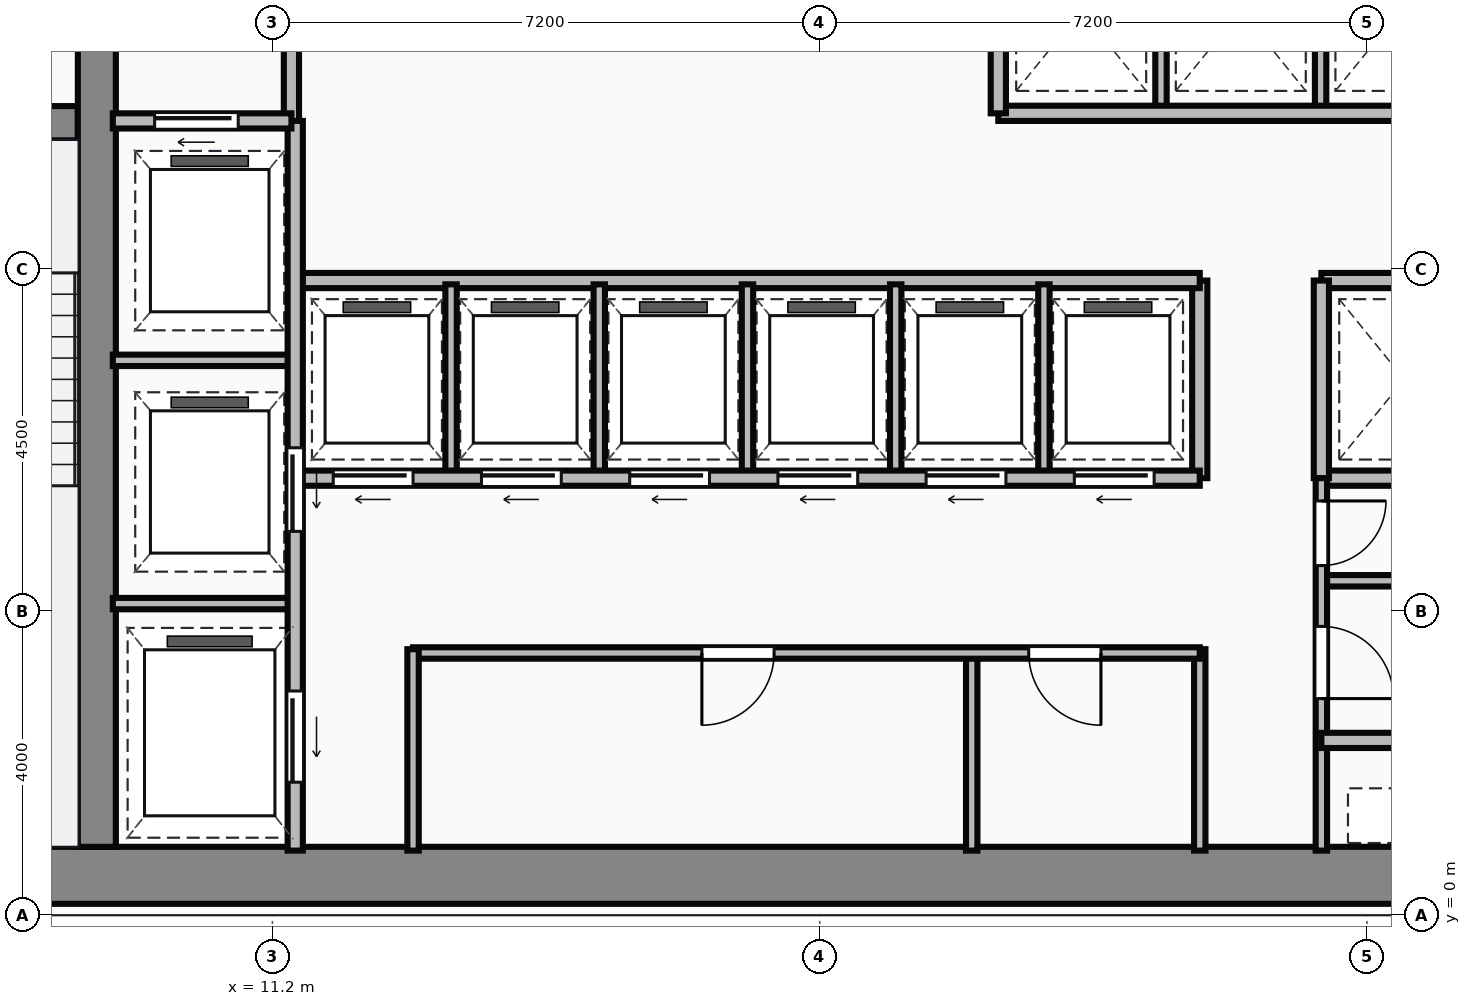
"""IFC4 building model, lengths in metres.
Left out: names, types, materials, properties, quantities, classifications, styles, units other than length and angle.
Written with IfcOpenShell. Run it as: python <this file> out.ifc"""

import sys

from ifc_helpers import new_model, si_unit, direction, frame, frame_2d, origin, place, context, subcontext, project, spatial, rectangle, extrude, source, transform, mapped, element, fill, save


model = new_model("IFC4")
c1 = context("Model", 3, precision=1e-05, world=origin(), true_north=direction((0.0, 1.0)))
c2 = subcontext(c1, "Body", "Model", "MODEL_VIEW")
j1 = project(units=[si_unit("LENGTHUNIT", "METRE"), si_unit("PLANEANGLEUNIT", "RADIAN")], contexts=[c1])
p1 = place(None, origin())
s1 = spatial("IfcSite", under=j1, at=p1, CompositionType="ELEMENT")
p2 = place(p1, origin())
s2 = spatial("IfcBuilding", under=s1, at=p2, CompositionType="ELEMENT")
p3 = place(p2, frame((0.0, 0.0, 140.6)))
s3 = spatial("IfcBuildingStorey", under=s2, at=p3, CompositionType="ELEMENT", Elevation=140.6)
m1 = source(origin(), c2, "Body", "SweptSolid", [
    extrude(rectangle(XDim=29.5, YDim=0.75, at=frame_2d((14.75, 0.0))), origin(), (0.0, 0.0, 1.0), 3.65),
])
p4 = place(p3, frame((4.5, 0.525, 0.0), z_axis=(0.0, 0.0, 1.0), x_axis=(1.0, 0.0, 0.0)))
e1 = element("IfcWall", 1, at=p4, inside=s3, PredefinedType="SHEAR", context=c2, shape_type="MappedRepresentation", body=[
    mapped(m1, transform((0.0, 0.0, 0.0))),
])
m2 = source(origin(), c2, "Body", "SweptSolid", [
    extrude(rectangle(XDim=12.35, YDim=0.5, at=frame_2d((6.175, 0.0))), origin(), (0.0, 0.0, 1.0), 3.65),
])
p5 = place(p3, frame((8.89, 0.9, 0.0), z_axis=(0.0, 0.0, 1.0), x_axis=(0.0, 1.0, 0.0)))
e2 = element("IfcWall", 2, at=p5, inside=s3, PredefinedType="SHEAR", context=c2, shape_type="MappedRepresentation", body=[
    mapped(m2, transform((0.0, 0.0, 0.0))),
])
m3 = source(origin(), c2, "Body", "SweptSolid", [
    extrude(rectangle(XDim=3.39, YDim=0.45, at=frame_2d((1.695, 0.0))), origin(), (0.0, 0.0, 1.0), 3.65),
])
p6 = place(p3, frame((5.25, 10.42, 0.0), z_axis=(0.0, 0.0, 1.0), x_axis=(1.0, 0.0, 0.0)))
e3 = element("IfcWall", 3, at=p6, inside=s3, PredefinedType="SHEAR", context=c2, shape_type="MappedRepresentation", body=[
    mapped(m3, transform((0.0, 0.0, 0.0))),
])
p7 = place(p6, frame((1.05, 0.0, 0.0)))
e4 = element("IfcOpeningElement", 4, at=p7, cuts=e3, PredefinedType="OPENING", context=c2, shape_type="SweptSolid", body=[
    extrude(rectangle(XDim=1.1, YDim=2.15, at=frame_2d((0.55, 1.075))), frame((0.0, 0.235, 0.0), z_axis=(0.0, -1.0, 0.0), x_axis=(1.0, 0.0, 0.0)), (0.0, 0.0, 1.0), 0.47),
])
m4 = source(origin(), c2, "Body", "SweptSolid", [
    extrude(rectangle(XDim=3.18, YDim=0.2, at=frame_2d((1.59, 0.0))), origin(), (0.0, 0.0, 1.0), 3.4),
])
p8 = place(p3, frame((11.45, 10.42, 0.0), z_axis=(0.0, 0.0, 1.0), x_axis=(0.0, 1.0, 0.0)))
e5 = element("IfcWall", 5, at=p8, inside=s3, PredefinedType="PARTITIONING", context=c2, shape_type="MappedRepresentation", body=[
    mapped(m4, transform((0.0, 0.0, 0.0))),
])
m5 = source(origin(), c2, "Body", "SweptSolid", [
    extrude(rectangle(XDim=2.35, YDim=0.2, at=frame_2d((1.175, 0.0))), origin(), (0.0, 0.0, 1.0), 3.4),
])
p9 = place(p3, frame((9.1, 10.45, 0.0), z_axis=(0.0, 0.0, 1.0), x_axis=(1.0, 0.0, 0.0)))
e6 = element("IfcWall", 6, at=p9, inside=s3, PredefinedType="PARTITIONING", context=c2, shape_type="MappedRepresentation", body=[
    mapped(m5, transform((0.0, 0.0, 0.0))),
])
p10 = place(p9, frame((0.55, 0.0, 0.0)))
e7 = element("IfcOpeningElement", 7, at=p10, cuts=e6, PredefinedType="OPENING", context=c2, shape_type="SweptSolid", body=[
    extrude(rectangle(XDim=1.1, YDim=2.15, at=frame_2d((0.55, 1.075))), frame((0.0, 0.11, 0.0), z_axis=(0.0, -1.0, 0.0), x_axis=(1.0, 0.0, 0.0)), (0.0, 0.0, 1.0), 0.22),
])
m6 = source(origin(), c2, "Body", "SweptSolid", [
    extrude(rectangle(XDim=9.6, YDim=0.2, at=frame_2d((4.8, 0.0))), origin(), (0.0, 0.0, 1.0), 3.4),
])
p11 = place(p3, frame((11.5, 0.85, 0.0), z_axis=(0.0, 0.0, 1.0), x_axis=(0.0, 1.0, 0.0)))
e8 = element("IfcWall", 8, at=p11, inside=s3, PredefinedType="PARTITIONING", context=c2, shape_type="MappedRepresentation", body=[
    mapped(m6, transform((0.0, 0.0, 0.0))),
])
p12 = place(p11, frame((4.2, 0.0, 0.0)))
e9 = element("IfcOpeningElement", 9, at=p12, cuts=e8, PredefinedType="OPENING", context=c2, shape_type="SweptSolid", body=[
    extrude(rectangle(XDim=1.1, YDim=2.15, at=frame_2d((0.55, 1.075))), frame((0.0, 0.11, 0.0), z_axis=(0.0, -1.0, 0.0), x_axis=(1.0, 0.0, 0.0)), (0.0, 0.0, 1.0), 0.22),
])
p13 = place(p11, frame((0.9, 0.0, 0.0)))
e10 = element("IfcOpeningElement", 10, at=p13, cuts=e8, PredefinedType="OPENING", context=c2, shape_type="SweptSolid", body=[
    extrude(rectangle(XDim=1.2, YDim=2.15, at=frame_2d((0.6, 1.075))), frame((0.0, 0.11, 0.0), z_axis=(0.0, -1.0, 0.0), x_axis=(1.0, 0.0, 0.0)), (0.0, 0.0, 1.0), 0.22),
])
m7 = source(origin(), c2, "Body", "SweptSolid", [
    extrude(rectangle(XDim=2.4, YDim=0.15, at=frame_2d((1.2, 0.0))), origin(), (0.0, 0.0, 1.0), 3.4),
])
for number, where, z_axis, x_axis in (
    (11, (9.1, 4.1, 0.0), (0.0, 0.0, 1.0), (1.0, 0.0, 0.0)),
    (12, (9.1, 7.3, 0.0), (0.0, 0.0, 1.0), (1.0, 0.0, 0.0)),
):
    element("IfcWall", number, at=place(p3, frame(where, z_axis=z_axis, x_axis=x_axis)), inside=s3, PredefinedType="PARTITIONING", context=c2, shape_type="MappedRepresentation", body=[
        mapped(m7, transform((0.0, 0.0, 0.0))),
    ])
m8 = source(origin(), c2, "Body", "SweptSolid", [
    extrude(rectangle(XDim=2.65, YDim=0.15, at=frame_2d((1.325, 0.0))), origin(), (0.0, 0.0, 1.0), 3.4),
])
p14 = place(p3, frame((13.05, 0.85, 0.0), z_axis=(0.0, 0.0, 1.0), x_axis=(0.0, 1.0, 0.0)))
e13 = element("IfcWall", 13, at=p14, inside=s3, PredefinedType="PARTITIONING", context=c2, shape_type="MappedRepresentation", body=[
    mapped(m8, transform((0.0, 0.0, 0.0))),
])
m9 = source(origin(), c2, "Body", "SweptSolid", [
    extrude(rectangle(XDim=10.35, YDim=0.15, at=frame_2d((5.175, 0.0))), origin(), (0.0, 0.0, 1.0), 3.4),
])
p15 = place(p3, frame((13.05, 3.45, 0.0), z_axis=(0.0, 0.0, 1.0), x_axis=(1.0, 0.0, 0.0)))
e14 = element("IfcWall", 14, at=p15, inside=s3, PredefinedType="PARTITIONING", context=c2, shape_type="MappedRepresentation", body=[
    mapped(m9, transform((0.0, 0.0, 0.0))),
])
p16 = place(p15, frame((3.8, 0.0, 0.0)))
e15 = element("IfcOpeningElement", 15, at=p16, cuts=e14, PredefinedType="OPENING", context=c2, shape_type="SweptSolid", body=[
    extrude(rectangle(XDim=0.95, YDim=2.15, at=frame_2d((0.475, 1.075))), frame((0.0, 0.085, 0.0), z_axis=(0.0, -1.0, 0.0), x_axis=(1.0, 0.0, 0.0)), (0.0, 0.0, 1.0), 0.17),
])
p17 = place(p15, frame((8.1, 0.0, 0.0)))
e16 = element("IfcOpeningElement", 16, at=p17, cuts=e14, PredefinedType="OPENING", context=c2, shape_type="SweptSolid", body=[
    extrude(rectangle(XDim=0.95, YDim=2.15, at=frame_2d((0.475, 1.075))), frame((0.0, 0.085, 0.0), z_axis=(0.0, -1.0, 0.0), x_axis=(1.0, 0.0, 0.0)), (0.0, 0.0, 1.0), 0.17),
])
p18 = place(p3, frame((23.4, 0.85, 0.0), z_axis=(0.0, 0.0, 1.0), x_axis=(0.0, 1.0, 0.0)))
e17 = element("IfcWall", 17, at=p18, inside=s3, PredefinedType="PARTITIONING", context=c2, shape_type="MappedRepresentation", body=[
    mapped(m8, transform((0.0, 0.0, 0.0))),
])
m10 = source(origin(), c2, "Body", "SweptSolid", [
    extrude(rectangle(XDim=2.6, YDim=0.15, at=frame_2d((1.3, 0.0))), origin(), (0.0, 0.0, 1.0), 3.4),
])
p19 = place(p3, frame((20.4, 0.85, 0.0), z_axis=(0.0, 0.0, 1.0), x_axis=(0.0, 1.0, 0.0)))
e18 = element("IfcWall", 18, at=p19, inside=s3, PredefinedType="PARTITIONING", context=c2, shape_type="MappedRepresentation", body=[
    mapped(m10, transform((0.0, 0.0, 0.0))),
])
m11 = source(origin(), c2, "Body", "SweptSolid", [
    extrude(rectangle(XDim=11.85, YDim=0.2, at=frame_2d((5.925, 0.0))), origin(), (0.0, 0.0, 1.0), 3.4),
])
p20 = place(p3, frame((11.55, 5.75, 0.0), z_axis=(0.0, 0.0, 1.0), x_axis=(1.0, 0.0, 0.0)))
e19 = element("IfcWall", 19, at=p20, inside=s3, PredefinedType="PARTITIONING", context=c2, shape_type="MappedRepresentation", body=[
    mapped(m11, transform((0.0, 0.0, 0.0))),
])
p21 = place(p20, frame((0.45, 0.0, 0.0)))
e20 = element("IfcOpeningElement", 20, at=p21, cuts=e19, PredefinedType="OPENING", context=c2, shape_type="SweptSolid", body=[
    extrude(rectangle(XDim=1.05, YDim=2.15, at=frame_2d((0.525, 1.075))), frame((0.0, 0.11, 0.0), z_axis=(0.0, -1.0, 0.0), x_axis=(1.0, 0.0, 0.0)), (0.0, 0.0, 1.0), 0.22),
])
p22 = place(p20, frame((2.4, 0.0, 0.0)))
e21 = element("IfcOpeningElement", 21, at=p22, cuts=e19, PredefinedType="OPENING", context=c2, shape_type="SweptSolid", body=[
    extrude(rectangle(XDim=1.05, YDim=2.15, at=frame_2d((0.525, 1.075))), frame((0.0, 0.11, 0.0), z_axis=(0.0, -1.0, 0.0), x_axis=(1.0, 0.0, 0.0)), (0.0, 0.0, 1.0), 0.22),
])
p23 = place(p20, frame((4.35, 0.0, 0.0)))
e22 = element("IfcOpeningElement", 22, at=p23, cuts=e19, PredefinedType="OPENING", context=c2, shape_type="SweptSolid", body=[
    extrude(rectangle(XDim=1.05, YDim=2.15, at=frame_2d((0.525, 1.075))), frame((0.0, 0.11, 0.0), z_axis=(0.0, -1.0, 0.0), x_axis=(1.0, 0.0, 0.0)), (0.0, 0.0, 1.0), 0.22),
])
p24 = place(p20, frame((6.3, 0.0, 0.0)))
e23 = element("IfcOpeningElement", 23, at=p24, cuts=e19, PredefinedType="OPENING", context=c2, shape_type="SweptSolid", body=[
    extrude(rectangle(XDim=1.05, YDim=2.15, at=frame_2d((0.525, 1.075))), frame((0.0, 0.11, 0.0), z_axis=(0.0, -1.0, 0.0), x_axis=(1.0, 0.0, 0.0)), (0.0, 0.0, 1.0), 0.22),
])
p25 = place(p20, frame((8.25, 0.0, 0.0)))
e24 = element("IfcOpeningElement", 24, at=p25, cuts=e19, PredefinedType="OPENING", context=c2, shape_type="SweptSolid", body=[
    extrude(rectangle(XDim=1.05, YDim=2.15, at=frame_2d((0.525, 1.075))), frame((0.0, 0.11, 0.0), z_axis=(0.0, -1.0, 0.0), x_axis=(1.0, 0.0, 0.0)), (0.0, 0.0, 1.0), 0.22),
])
p26 = place(p20, frame((10.2, 0.0, 0.0)))
e25 = element("IfcOpeningElement", 25, at=p26, cuts=e19, PredefinedType="OPENING", context=c2, shape_type="SweptSolid", body=[
    extrude(rectangle(XDim=1.05, YDim=2.15, at=frame_2d((0.525, 1.075))), frame((0.0, 0.11, 0.0), z_axis=(0.0, -1.0, 0.0), x_axis=(1.0, 0.0, 0.0)), (0.0, 0.0, 1.0), 0.22),
])
p27 = place(p3, frame((11.55, 8.35, 0.0), z_axis=(0.0, 0.0, 1.0), x_axis=(1.0, 0.0, 0.0)))
e26 = element("IfcWall", 26, at=p27, inside=s3, PredefinedType="PARTITIONING", context=c2, shape_type="MappedRepresentation", body=[
    mapped(m11, transform((0.0, 0.0, 0.0))),
])
m12 = source(origin(), c2, "Body", "SweptSolid", [
    extrude(rectangle(XDim=2.6, YDim=0.2, at=frame_2d((1.3, 0.0))), origin(), (0.0, 0.0, 1.0), 3.4),
])
p28 = place(p3, frame((23.4, 5.75, 0.0), z_axis=(0.0, 0.0, 1.0), x_axis=(0.0, 1.0, 0.0)))
e27 = element("IfcWall", 27, at=p28, inside=s3, PredefinedType="PARTITIONING", context=c2, shape_type="MappedRepresentation", body=[
    mapped(m12, transform((0.0, 0.0, 0.0))),
])
m13 = source(origin(), c2, "Body", "SweptSolid", [
    extrude(rectangle(XDim=2.5, YDim=0.15, at=frame_2d((1.25, 0.0))), origin(), (0.0, 0.0, 1.0), 3.4),
])
for number, where, z_axis, x_axis in (
    (28, (13.55, 5.8, 0.0), (0.0, 0.0, 1.0), (0.0, 1.0, 0.0)),
    (29, (15.5, 5.8, 0.0), (0.0, 0.0, 1.0), (0.0, 1.0, 0.0)),
    (30, (17.45, 5.8, 0.0), (0.0, 0.0, 1.0), (0.0, 1.0, 0.0)),
    (31, (19.4, 5.8, 0.0), (0.0, 0.0, 1.0), (0.0, 1.0, 0.0)),
    (32, (21.35, 5.8, 0.0), (0.0, 0.0, 1.0), (0.0, 1.0, 0.0)),
):
    element("IfcWall", number, at=place(p3, frame(where, z_axis=z_axis, x_axis=x_axis)), inside=s3, PredefinedType="PARTITIONING", context=c2, shape_type="MappedRepresentation", body=[
        mapped(m13, transform((0.0, 0.0, 0.0))),
    ])
m14 = source(origin(), c2, "Body", "SweptSolid", [
    extrude(rectangle(XDim=8.8, YDim=0.2, at=frame_2d((4.4, 0.0))), origin(), (0.0, 0.0, 1.0), 3.4),
])
p29 = place(p3, frame((20.75, 10.55, 0.0), z_axis=(0.0, 0.0, 1.0), x_axis=(1.0, 0.0, 0.0)))
e33 = element("IfcWall", 33, at=p29, inside=s3, PredefinedType="PARTITIONING", context=c2, shape_type="MappedRepresentation", body=[
    mapped(m14, transform((0.0, 0.0, 0.0))),
])
m15 = source(origin(), c2, "Body", "SweptSolid", [
    extrude(rectangle(XDim=3.0, YDim=0.2, at=frame_2d((1.5, 0.0))), origin(), (0.0, 0.0, 1.0), 3.4),
])
p30 = place(p3, frame((20.75, 10.55, 0.0), z_axis=(0.0, 0.0, 1.0), x_axis=(0.0, 1.0, 0.0)))
e34 = element("IfcWall", 34, at=p30, inside=s3, PredefinedType="PARTITIONING", context=c2, shape_type="MappedRepresentation", body=[
    mapped(m15, transform((0.0, 0.0, 0.0))),
])
m16 = source(origin(), c2, "Body", "SweptSolid", [
    extrude(rectangle(XDim=2.85, YDim=0.15, at=frame_2d((1.425, 0.0))), origin(), (0.0, 0.0, 1.0), 3.4),
])
for number, where, z_axis, x_axis in (
    (35, (22.89, 10.6, 0.0), (0.0, 0.0, 1.0), (0.0, 1.0, 0.0)),
    (36, (24.99, 10.6, 0.0), (0.0, 0.0, 1.0), (0.0, 1.0, 0.0)),
):
    element("IfcWall", number, at=place(p3, frame(where, z_axis=z_axis, x_axis=x_axis)), inside=s3, PredefinedType="PARTITIONING", context=c2, shape_type="MappedRepresentation", body=[
        mapped(m16, transform((0.0, 0.0, 0.0))),
    ])
m17 = source(origin(), c2, "Body", "SweptSolid", [
    extrude(rectangle(XDim=4.55, YDim=0.2, at=frame_2d((2.275, 0.0))), origin(), (0.0, 0.0, 1.0), 3.4),
])
for number, where, z_axis, x_axis in (
    (37, (25.0, 8.35, 0.0), (0.0, 0.0, 1.0), (1.0, 0.0, 0.0)),
    (38, (25.0, 5.75, 0.0), (0.0, 0.0, 1.0), (1.0, 0.0, 0.0)),
):
    element("IfcWall", number, at=place(p3, frame(where, z_axis=z_axis, x_axis=x_axis)), inside=s3, PredefinedType="PARTITIONING", context=c2, shape_type="MappedRepresentation", body=[
        mapped(m17, transform((0.0, 0.0, 0.0))),
    ])
p31 = place(p3, frame((25.0, 5.75, 0.0), z_axis=(0.0, 0.0, 1.0), x_axis=(0.0, 1.0, 0.0)))
e39 = element("IfcWall", 39, at=p31, inside=s3, PredefinedType="PARTITIONING", context=c2, shape_type="MappedRepresentation", body=[
    mapped(m12, transform((0.0, 0.0, 0.0))),
])
m18 = source(origin(), c2, "Body", "SweptSolid", [
    extrude(rectangle(XDim=4.9, YDim=0.15, at=frame_2d((2.45, 0.0))), origin(), (0.0, 0.0, 1.0), 3.4),
])
p32 = place(p3, frame((25.0, 0.85, 0.0), z_axis=(0.0, 0.0, 1.0), x_axis=(0.0, 1.0, 0.0)))
e40 = element("IfcWall", 40, at=p32, inside=s3, PredefinedType="PARTITIONING", context=c2, shape_type="MappedRepresentation", body=[
    mapped(m18, transform((0.0, 0.0, 0.0))),
])
p33 = place(p32, frame((2.0, 0.0, 0.0)))
e41 = element("IfcOpeningElement", 41, at=p33, cuts=e40, PredefinedType="OPENING", context=c2, shape_type="SweptSolid", body=[
    extrude(rectangle(XDim=0.95, YDim=2.15, at=frame_2d((0.475, 1.075))), frame((0.0, 0.085, 0.0), z_axis=(0.0, -1.0, 0.0), x_axis=(1.0, 0.0, 0.0)), (0.0, 0.0, 1.0), 0.17),
])
p34 = place(p32, frame((3.75, 0.0, 0.0)))
e42 = element("IfcOpeningElement", 42, at=p34, cuts=e40, PredefinedType="OPENING", context=c2, shape_type="SweptSolid", body=[
    extrude(rectangle(XDim=0.85, YDim=2.15, at=frame_2d((0.425, 1.075))), frame((0.0, 0.085, 0.0), z_axis=(0.0, -1.0, 0.0), x_axis=(1.0, 0.0, 0.0)), (0.0, 0.0, 1.0), 0.17),
])
m19 = source(origin(), c2, "Body", "SweptSolid", [
    extrude(rectangle(XDim=2.4, YDim=0.2, at=frame_2d((1.2, 0.0))), origin(), (0.0, 0.0, 1.0), 3.4),
])
p35 = place(p3, frame((25.0, 2.3, 0.0), z_axis=(0.0, 0.0, 1.0), x_axis=(1.0, 0.0, 0.0)))
e43 = element("IfcWall", 43, at=p35, inside=s3, PredefinedType="PARTITIONING", context=c2, shape_type="MappedRepresentation", body=[
    mapped(m19, transform((0.0, 0.0, 0.0))),
])
m20 = source(origin(), c2, "Body", "SweptSolid", [
    extrude(rectangle(XDim=4.55, YDim=0.15, at=frame_2d((2.275, 0.0))), origin(), (0.0, 0.0, 1.0), 3.4),
])
p36 = place(p3, frame((25.0, 4.4, 0.0), z_axis=(0.0, 0.0, 1.0), x_axis=(1.0, 0.0, 0.0)))
e44 = element("IfcWall", 44, at=p36, inside=s3, PredefinedType="PARTITIONING", context=c2, shape_type="MappedRepresentation", body=[
    mapped(m20, transform((0.0, 0.0, 0.0))),
])
m21 = source(origin(), c2, "Body", "SweptSolid", [
    extrude(rectangle(XDim=1.1, YDim=2.15, at=frame_2d((0.55, 1.075))), frame((0.0, 0.025, 0.0), z_axis=(0.0, -1.0, 0.0), x_axis=(1.0, 0.0, 0.0)), (0.0, 0.0, 1.0), 0.05),
])
p37 = place(p10, origin())
e45 = element("IfcDoor", 45, at=p37, inside=s3, OperationType="SLIDING_TO_LEFT", PredefinedType="DOOR", context=c2, shape_type="MappedRepresentation", body=[
    mapped(m21, transform((0.0, 0.0, 0.0))),
])
fill(e7, e45)
p38 = place(p12, frame((1.1, 0.0, 0.0), z_axis=(0.0, 0.0, 1.0), x_axis=(-1.0, 0.0, 0.0)))
e46 = element("IfcDoor", 46, at=p38, inside=s3, OperationType="SLIDING_TO_LEFT", PredefinedType="DOOR", context=c2, shape_type="MappedRepresentation", body=[
    mapped(m21, transform((0.0, 0.0, 0.0))),
])
fill(e9, e46)
m22 = source(origin(), c2, "Body", "SweptSolid", [
    extrude(rectangle(XDim=1.2, YDim=2.15, at=frame_2d((0.6, 1.075))), frame((0.0, 0.025, 0.0), z_axis=(0.0, -1.0, 0.0), x_axis=(1.0, 0.0, 0.0)), (0.0, 0.0, 1.0), 0.05),
])
p39 = place(p13, frame((1.2, 0.0, 0.0), z_axis=(0.0, 0.0, 1.0), x_axis=(-1.0, 0.0, 0.0)))
e47 = element("IfcDoor", 47, at=p39, inside=s3, OperationType="SLIDING_TO_LEFT", PredefinedType="DOOR", context=c2, shape_type="MappedRepresentation", body=[
    mapped(m22, transform((0.0, 0.0, 0.0))),
])
fill(e10, e47)
m23 = source(origin(), c2, "Body", "SweptSolid", [
    extrude(rectangle(XDim=0.95, YDim=2.15, at=frame_2d((0.475, 1.075))), frame((0.0, 0.025, 0.0), z_axis=(0.0, -1.0, 0.0), x_axis=(1.0, 0.0, 0.0)), (0.0, 0.0, 1.0), 0.05),
])
p40 = place(p16, origin())
e48 = element("IfcDoor", 48, at=p40, inside=s3, OperationType="SINGLE_SWING_LEFT", PredefinedType="DOOR", context=c2, shape_type="MappedRepresentation", body=[
    mapped(m23, transform((0.0, 0.0, 0.0))),
])
fill(e15, e48)
p41 = place(p17, origin())
e49 = element("IfcDoor", 49, at=p41, inside=s3, OperationType="SINGLE_SWING_RIGHT", PredefinedType="DOOR", context=c2, shape_type="MappedRepresentation", body=[
    mapped(m23, transform((0.0, 0.0, 0.0))),
])
fill(e16, e49)
m24 = source(origin(), c2, "Body", "SweptSolid", [
    extrude(rectangle(XDim=1.05, YDim=2.15, at=frame_2d((0.525, 1.075))), frame((0.0, 0.025, 0.0), z_axis=(0.0, -1.0, 0.0), x_axis=(1.0, 0.0, 0.0)), (0.0, 0.0, 1.0), 0.05),
])
p42 = place(p21, frame((1.05, 0.0, 0.0), z_axis=(0.0, 0.0, 1.0), x_axis=(-1.0, 0.0, 0.0)))
e50 = element("IfcDoor", 50, at=p42, inside=s3, OperationType="SLIDING_TO_LEFT", PredefinedType="DOOR", context=c2, shape_type="MappedRepresentation", body=[
    mapped(m24, transform((0.0, 0.0, 0.0))),
])
fill(e20, e50)
p43 = place(p22, frame((1.05, 0.0, 0.0), z_axis=(0.0, 0.0, 1.0), x_axis=(-1.0, 0.0, 0.0)))
e51 = element("IfcDoor", 51, at=p43, inside=s3, OperationType="SLIDING_TO_LEFT", PredefinedType="DOOR", context=c2, shape_type="MappedRepresentation", body=[
    mapped(m24, transform((0.0, 0.0, 0.0))),
])
fill(e21, e51)
p44 = place(p23, frame((1.05, 0.0, 0.0), z_axis=(0.0, 0.0, 1.0), x_axis=(-1.0, 0.0, 0.0)))
e52 = element("IfcDoor", 52, at=p44, inside=s3, OperationType="SLIDING_TO_LEFT", PredefinedType="DOOR", context=c2, shape_type="MappedRepresentation", body=[
    mapped(m24, transform((0.0, 0.0, 0.0))),
])
fill(e22, e52)
p45 = place(p24, frame((1.05, 0.0, 0.0), z_axis=(0.0, 0.0, 1.0), x_axis=(-1.0, 0.0, 0.0)))
e53 = element("IfcDoor", 53, at=p45, inside=s3, OperationType="SLIDING_TO_LEFT", PredefinedType="DOOR", context=c2, shape_type="MappedRepresentation", body=[
    mapped(m24, transform((0.0, 0.0, 0.0))),
])
fill(e23, e53)
p46 = place(p25, frame((1.05, 0.0, 0.0), z_axis=(0.0, 0.0, 1.0), x_axis=(-1.0, 0.0, 0.0)))
e54 = element("IfcDoor", 54, at=p46, inside=s3, OperationType="SLIDING_TO_LEFT", PredefinedType="DOOR", context=c2, shape_type="MappedRepresentation", body=[
    mapped(m24, transform((0.0, 0.0, 0.0))),
])
fill(e24, e54)
p47 = place(p26, frame((1.05, 0.0, 0.0), z_axis=(0.0, 0.0, 1.0), x_axis=(-1.0, 0.0, 0.0)))
e55 = element("IfcDoor", 55, at=p47, inside=s3, OperationType="SLIDING_TO_LEFT", PredefinedType="DOOR", context=c2, shape_type="MappedRepresentation", body=[
    mapped(m24, transform((0.0, 0.0, 0.0))),
])
fill(e25, e55)
p48 = place(p33, origin())
e56 = element("IfcDoor", 56, at=p48, inside=s3, OperationType="SINGLE_SWING_LEFT", PredefinedType="DOOR", context=c2, shape_type="MappedRepresentation", body=[
    mapped(m23, transform((0.0, 0.0, 0.0))),
])
fill(e41, e56)
m25 = source(origin(), c2, "Body", "SweptSolid", [
    extrude(rectangle(XDim=0.85, YDim=2.15, at=frame_2d((0.425, 1.075))), frame((0.0, 0.025, 0.0), z_axis=(0.0, -1.0, 0.0), x_axis=(1.0, 0.0, 0.0)), (0.0, 0.0, 1.0), 0.05),
])
p49 = place(p34, origin())
e57 = element("IfcDoor", 57, at=p49, inside=s3, OperationType="SINGLE_SWING_RIGHT", PredefinedType="DOOR", context=c2, shape_type="MappedRepresentation", body=[
    mapped(m25, transform((0.0, 0.0, 0.0))),
])
fill(e42, e57)
save(model, sys.argv[1])
